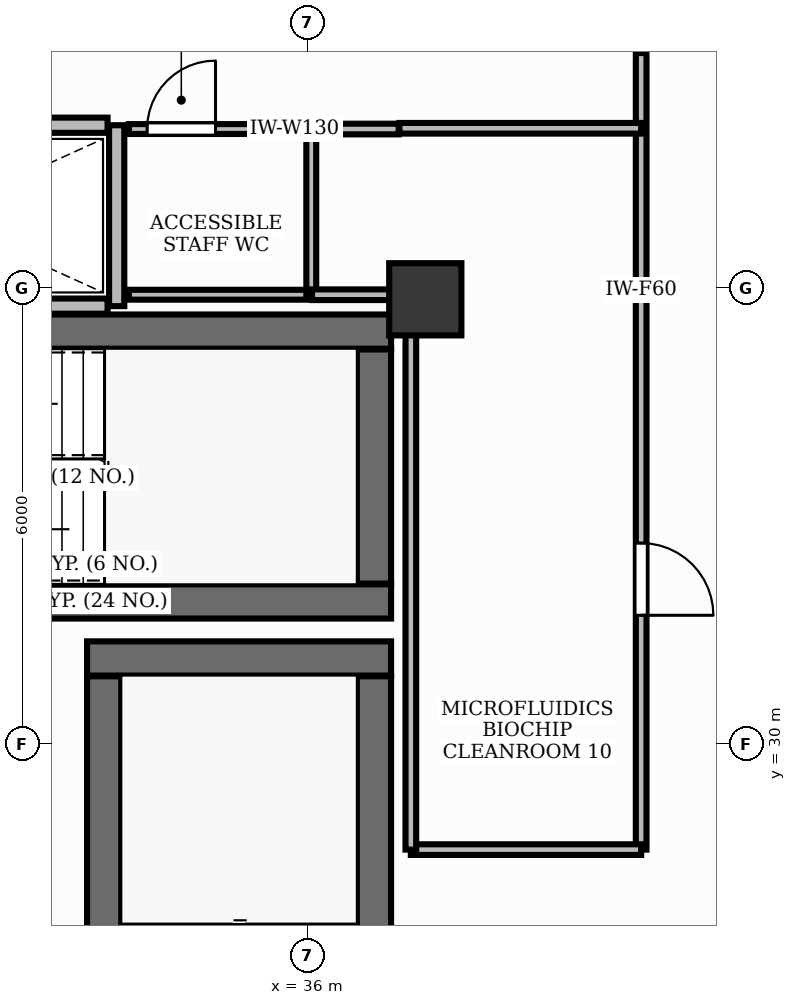
"""IFC4 building model, lengths in metres.
Left out: names, types, materials, properties, quantities, classifications, styles, units other than length and angle.
Written with IfcOpenShell. Run it as: python <this file> out.ifc"""

import sys

from ifc_helpers import new_model, si_unit, direction, frame, frame_2d, origin, origin_2d, place, context, subcontext, project, spatial, rectangle, extrude, element, fill, save


model = new_model("IFC4")
c1 = context("Model", 3, precision=1e-05, world=origin(), true_north=direction((0.0, 1.0)))
c2 = subcontext(c1, "Body", "Model", "MODEL_VIEW")
j1 = project(units=[si_unit("LENGTHUNIT", "METRE"), si_unit("PLANEANGLEUNIT", "RADIAN")], contexts=[c1])
p1 = place(None, origin())
s1 = spatial("IfcSite", under=j1, at=p1, CompositionType="ELEMENT")
p2 = place(p1, origin())
s2 = spatial("IfcBuilding", under=s1, at=p2, CompositionType="ELEMENT")
p3 = place(p2, frame((0.0, 0.0, 30.0)))
s3 = spatial("IfcBuildingStorey", under=s2, at=p3, CompositionType="ELEMENT", Elevation=30.0)
p4 = place(p3, frame((28.852, 35.425, 0.0), z_axis=(0.0, 0.0, 1.0), x_axis=(1.0, 0.0, 0.0)))
e1 = element("IfcWall", 1, at=p4, inside=s3, PredefinedType="SHEAR", context=c2, shape_type="SweptSolid", body=[
    extrude(rectangle(XDim=8.248, YDim=0.45, at=frame_2d((4.124, 0.0))), origin(), (0.0, 0.0, 1.0), 3.9),
])
p5 = place(p3, frame((28.35, 31.875, 0.0), z_axis=(0.0, 0.0, 1.0), x_axis=(1.0, 0.0, 0.0)))
e2 = element("IfcWall", 2, at=p5, inside=s3, PredefinedType="SHEAR", context=c2, shape_type="SweptSolid", body=[
    extrude(rectangle(XDim=8.75, YDim=0.45, at=frame_2d((4.375, 0.0))), origin(), (0.0, 0.0, 1.0), 3.9),
])
p6 = place(p3, frame((36.875, 32.11, 0.0), z_axis=(0.0, 0.0, 1.0), x_axis=(0.0, 1.0, 0.0)))
e3 = element("IfcWall", 3, at=p6, inside=s3, PredefinedType="SHEAR", context=c2, shape_type="SweptSolid", body=[
    extrude(rectangle(XDim=3.08, YDim=0.45, at=frame_2d((1.54, 0.0))), origin(), (0.0, 0.0, 1.0), 3.9),
])
p7 = place(p3, frame((33.1, 31.125, 0.0), z_axis=(0.0, 0.0, 1.0), x_axis=(1.0, 0.0, 0.0)))
e4 = element("IfcWall", 4, at=p7, inside=s3, PredefinedType="SHEAR", context=c2, shape_type="SweptSolid", body=[
    extrude(rectangle(XDim=4.0, YDim=0.45, at=frame_2d((2.0, 0.0))), origin(), (0.0, 0.0, 1.0), 3.9),
])
p8 = place(p3, frame((36.875, 23.11, 0.0), z_axis=(0.0, 0.0, 1.0), x_axis=(0.0, 1.0, 0.0)))
e5 = element("IfcWall", 5, at=p8, inside=s3, PredefinedType="SHEAR", context=c2, shape_type="SweptSolid", body=[
    extrude(rectangle(XDim=7.78, YDim=0.45, at=frame_2d((3.89, 0.0))), origin(), (0.0, 0.0, 1.0), 3.9),
])
p9 = place(p3, frame((33.325, 23.11, 0.0), z_axis=(0.0, 0.0, 1.0), x_axis=(0.0, 1.0, 0.0)))
e6 = element("IfcWall", 6, at=p9, inside=s3, PredefinedType="SHEAR", context=c2, shape_type="SweptSolid", body=[
    extrude(rectangle(XDim=7.78, YDim=0.45, at=frame_2d((3.89, 0.0))), origin(), (0.0, 0.0, 1.0), 3.9),
])
p10 = place(p9, frame((0.2, 0.0, 0.0)))
e7 = element("IfcOpeningElement", 7, at=p10, cuts=e6, PredefinedType="OPENING", context=c2, shape_type="SweptSolid", body=[
    extrude(rectangle(XDim=1.05, YDim=2.15, at=frame_2d((0.525, 1.075))), frame((0.0, 0.24, 0.0), z_axis=(0.0, -1.0, 0.0), x_axis=(1.0, 0.0, 0.0)), (0.0, 0.0, 1.0), 0.48),
])
p11 = place(p3, frame((37.55, 35.85, -0.0), z_axis=(0.0, 0.0, 1.0), x_axis=(1.0, 0.0, 0.0)))
e8 = element("IfcColumn", 8, at=p11, inside=s3, PredefinedType="PILASTER", context=c2, shape_type="SweptSolid", body=[
    extrude(rectangle(XDim=0.95, YDim=0.95, at=origin_2d()), origin(), (0.0, 0.0, 1.0), 3.901),
])
p12 = place(p3, frame((33.49, 35.76, 0.0), z_axis=(0.0, 0.0, 1.0), x_axis=(0.0, 1.0, 0.0)))
e9 = element("IfcWall", 9, at=p12, inside=s3, PredefinedType="PARTITIONING", context=c2, shape_type="SweptSolid", body=[
    extrude(rectangle(XDim=2.38, YDim=0.2, at=frame_2d((1.19, 0.0))), origin(), (0.0, 0.0, 1.0), 2.91),
])
for number, where, z_axis, x_axis in (
    (10, (28.8, 35.76, 0.0), (0.0, 0.0, 1.0), (1.0, 0.0, 0.0)),
    (11, (28.8, 38.14, 0.0), (0.0, 0.0, 1.0), (1.0, 0.0, 0.0)),
):
    element("IfcWall", number, at=place(p3, frame(where, z_axis=z_axis, x_axis=x_axis)), inside=s3, PredefinedType="PARTITIONING", context=c2, shape_type="SweptSolid", body=[
        extrude(rectangle(XDim=4.57, YDim=0.2, at=frame_2d((2.285, 0.0))), origin(), (0.0, 0.0, 1.0), 2.91),
    ])
p13 = place(p3, frame((33.65, 38.09, 0.0), z_axis=(0.0, 0.0, 1.0), x_axis=(1.0, 0.0, 0.0)))
e12 = element("IfcWall", 12, at=p13, inside=s3, PredefinedType="PARTITIONING", context=c2, shape_type="SweptSolid", body=[
    extrude(rectangle(XDim=2.4, YDim=0.13, at=frame_2d((1.2, 0.0))), origin(), (0.0, 0.0, 1.0), 2.91),
])
p14 = place(p13, frame((0.24, 0.0, 0.0)))
e13 = element("IfcOpeningElement", 13, at=p14, cuts=e12, PredefinedType="OPENING", context=c2, shape_type="SweptSolid", body=[
    extrude(rectangle(XDim=0.9, YDim=2.15, at=frame_2d((0.45, 1.075))), frame((0.0, 0.08, 0.0), z_axis=(0.0, -1.0, 0.0), x_axis=(1.0, 0.0, 0.0)), (0.0, 0.0, 1.0), 0.16),
])
p15 = place(p3, frame((40.39, 39.09, 0.0), z_axis=(0.0, 0.0, 1.0), x_axis=(0.0, -1.0, 0.0)))
e14 = element("IfcWall", 14, at=p15, inside=s3, PredefinedType="PARTITIONING", context=c2, shape_type="SweptSolid", body=[
    extrude(rectangle(XDim=10.48, YDim=0.14, at=frame_2d((5.24, 0.0))), origin(), (0.0, 0.0, 1.0), 2.91),
])
p16 = place(p15, frame((6.447, 0.0, 0.0)))
e15 = element("IfcOpeningElement", 15, at=p16, cuts=e14, PredefinedType="OPENING", context=c2, shape_type="SweptSolid", body=[
    extrude(rectangle(XDim=0.95, YDim=2.15, at=frame_2d((0.475, 1.075))), frame((0.0, 0.085, 0.0), z_axis=(0.0, -1.0, 0.0), x_axis=(1.0, 0.0, 0.0)), (0.0, 0.0, 1.0), 0.17),
])
p17 = place(p3, frame((36.05, 35.91, 0.0), z_axis=(0.0, 0.0, 1.0), x_axis=(-1.0, 0.0, 0.0)))
e16 = element("IfcWall", 16, at=p17, inside=s3, PredefinedType="PARTITIONING", context=c2, shape_type="SweptSolid", body=[
    extrude(rectangle(XDim=2.4, YDim=0.13, at=frame_2d((1.2, 0.0))), origin(), (0.0, 0.0, 1.0), 2.91),
])
p18 = place(p3, frame((36.05, 38.09, 0.0), z_axis=(0.0, 0.0, 1.0), x_axis=(0.0, -1.0, 0.0)))
e17 = element("IfcWall", 17, at=p18, inside=s3, PredefinedType="PARTITIONING", context=c2, shape_type="SweptSolid", body=[
    extrude(rectangle(XDim=2.18, YDim=0.13, at=frame_2d((1.09, 0.0))), origin(), (0.0, 0.0, 1.0), 2.91),
])
p19 = place(p3, frame((36.06, 38.09, 0.0), z_axis=(0.0, 0.0, 1.0), x_axis=(1.0, 0.0, 0.0)))
e18 = element("IfcWall", 18, at=p19, inside=s3, PredefinedType="PARTITIONING", context=c2, shape_type="SweptSolid", body=[
    extrude(rectangle(XDim=1.14, YDim=0.14, at=frame_2d((0.57, 0.0))), origin(), (0.0, 0.0, 1.0), 2.91),
])
p20 = place(p3, frame((37.21, 38.1, 0.0), z_axis=(0.0, 0.0, 1.0), x_axis=(1.0, 0.0, 0.0)))
e19 = element("IfcWall", 19, at=p20, inside=s3, PredefinedType="PARTITIONING", context=c2, shape_type="SweptSolid", body=[
    extrude(rectangle(XDim=3.18, YDim=0.14, at=frame_2d((1.59, 0.0))), origin(), (0.0, 0.0, 1.0), 2.91),
])
p21 = place(p3, frame((40.39, 28.61, 0.0), z_axis=(0.0, 0.0, 1.0), x_axis=(-1.0, 0.0, 0.0)))
e20 = element("IfcWall", 20, at=p21, inside=s3, PredefinedType="PARTITIONING", context=c2, shape_type="SweptSolid", body=[
    extrude(rectangle(XDim=3.03, YDim=0.14, at=frame_2d((1.515, 0.0))), origin(), (0.0, 0.0, 1.0), 2.91),
])
p22 = place(p3, frame((37.36, 28.61, 0.0), z_axis=(0.0, 0.0, 1.0), x_axis=(0.0, 1.0, 0.0)))
e21 = element("IfcWall", 21, at=p22, inside=s3, PredefinedType="PARTITIONING", context=c2, shape_type="SweptSolid", body=[
    extrude(rectangle(XDim=7.29, YDim=0.14, at=frame_2d((3.645, 0.0))), origin(), (0.0, 0.0, 1.0), 2.91),
])
p23 = place(p3, frame((37.35, 35.91, 0.0), z_axis=(0.0, 0.0, 1.0), x_axis=(-1.0, 0.0, 0.0)))
e22 = element("IfcWall", 22, at=p23, inside=s3, PredefinedType="PARTITIONING", context=c2, shape_type="SweptSolid", body=[
    extrude(rectangle(XDim=1.29, YDim=0.14, at=frame_2d((0.645, 0.0))), origin(), (0.0, 0.0, 1.0), 2.91),
])
p24 = place(p14, origin())
e23 = element("IfcDoor", 23, at=p24, inside=s3, OperationType="SINGLE_SWING_RIGHT", PredefinedType="DOOR", context=c2, shape_type="SweptSolid", body=[
    extrude(rectangle(XDim=0.9, YDim=2.15, at=frame_2d((0.45, 1.075))), frame((0.0, 0.025, 0.0), z_axis=(0.0, -1.0, 0.0), x_axis=(1.0, 0.0, 0.0)), (0.0, 0.0, 1.0), 0.05),
])
fill(e13, e23)
p25 = place(p16, origin())
e24 = element("IfcDoor", 24, at=p25, inside=s3, OperationType="SINGLE_SWING_RIGHT", PredefinedType="DOOR", context=c2, shape_type="SweptSolid", body=[
    extrude(rectangle(XDim=0.95, YDim=2.15, at=frame_2d((0.475, 1.075))), frame((0.0, 0.025, 0.0), z_axis=(0.0, -1.0, 0.0), x_axis=(1.0, 0.0, 0.0)), (0.0, 0.0, 1.0), 0.05),
])
fill(e15, e24)
save(model, sys.argv[1])
